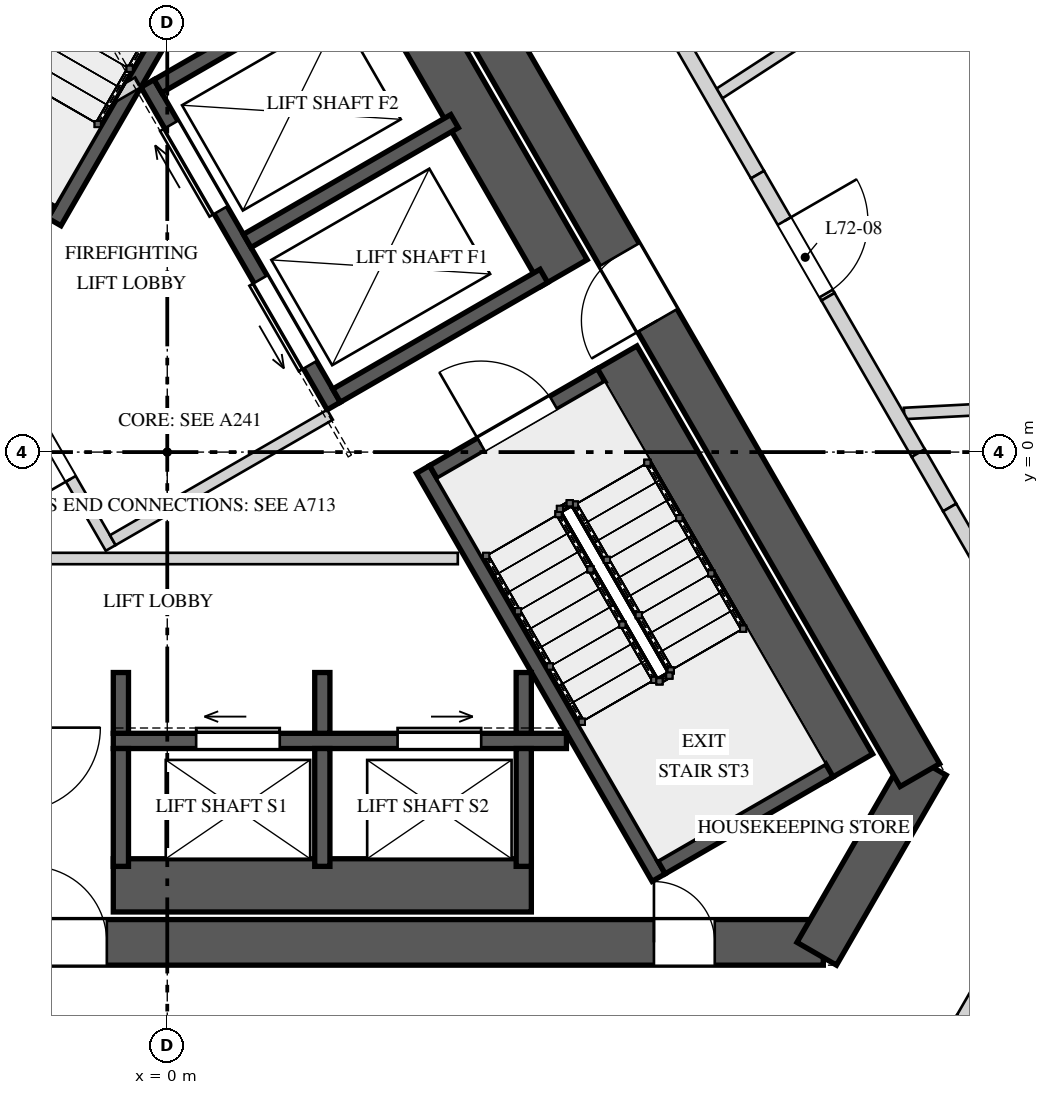
"""IFC4 building model, lengths in metres.
Left out: names, types, materials, properties, quantities, classifications, styles, units other than length and angle.
Written with IfcOpenShell. Run it as: python <this file> out.ifc"""

import sys

from ifc_helpers import new_model, si_unit, direction, frame, frame_2d, origin, place, context, subcontext, project, spatial, polyline, rectangle, outline, extrude, element, fill, save


model = new_model("IFC4")
c1 = context("Model", 3, precision=1e-05, world=origin(), true_north=direction((0.0, 1.0)))
c2 = subcontext(c1, "Body", "Model", "MODEL_VIEW")
j1 = project(units=[si_unit("LENGTHUNIT", "METRE"), si_unit("PLANEANGLEUNIT", "RADIAN")], contexts=[c1])
p1 = place(None, origin())
s1 = spatial("IfcSite", under=j1, at=p1, CompositionType="ELEMENT")
p2 = place(p1, origin())
s2 = spatial("IfcBuilding", under=s1, at=p2, CompositionType="ELEMENT")
p3 = place(p2, frame((0.0, 0.0, 306.4)))
s3 = spatial("IfcBuildingStorey", under=s2, at=p3, CompositionType="ELEMENT", Elevation=306.4)
p4 = place(p3, frame((-1.27, 10.7, 0.0), z_axis=(0.0, 0.0, 1.0), x_axis=(-0.499999536116, -0.866025671608, 0.0)))
e1 = element("IfcWall", 1, at=p4, inside=s3, PredefinedType="SHEAR", context=c2, shape_type="SweptSolid", body=[
    extrude(rectangle(XDim=17.263, YDim=0.6, at=frame_2d((8.631, 0.0))), origin(), (0.0, 0.0, 1.0), 14.0),
])
p5 = place(p4, frame((6.836, 0.0, 0.0)))
e2 = element("IfcOpeningElement", 2, at=p5, cuts=e1, PredefinedType="OPENING", context=c2, shape_type="SweptSolid", body=[
    extrude(rectangle(XDim=1.0, YDim=2.4, at=frame_2d((0.5, 1.2))), frame((0.0, 0.31, 0.0), z_axis=(0.0, -1.0, 0.0), x_axis=(1.0, 0.0, 0.0)), (0.0, 0.0, 1.0), 0.62),
])
p6 = place(p3, frame((-8.631, -6.45, 0.0), z_axis=(0.0, 0.0, 1.0), x_axis=(1.0, 0.0, 0.0)))
e3 = element("IfcWall", 3, at=p6, inside=s3, PredefinedType="SHEAR", context=c2, shape_type="SweptSolid", body=[
    extrude(rectangle(XDim=17.263, YDim=0.6, at=frame_2d((8.631, 0.0))), origin(), (0.0, 0.0, 1.0), 14.0),
])
p7 = place(p6, frame((6.836, 0.0, 0.0)))
e4 = element("IfcOpeningElement", 4, at=p7, cuts=e3, PredefinedType="OPENING", context=c2, shape_type="SweptSolid", body=[
    extrude(rectangle(XDim=1.0, YDim=2.4, at=frame_2d((0.5, 1.2))), frame((0.0, 0.31, 0.0), z_axis=(0.0, -1.0, 0.0), x_axis=(1.0, 0.0, 0.0)), (0.0, 0.0, 1.0), 0.62),
])
p8 = place(p6, frame((15.034, 0.0, 0.0)))
e5 = element("IfcOpeningElement", 5, at=p8, cuts=e3, PredefinedType="OPENING", context=c2, shape_type="SweptSolid", body=[
    extrude(rectangle(XDim=0.8, YDim=2.1, at=frame_2d((0.4, 1.05))), frame((0.0, 0.31, 0.0), z_axis=(0.0, -1.0, 0.0), x_axis=(1.0, 0.0, 0.0)), (0.0, 0.0, 1.0), 0.62),
])
p9 = place(p3, frame((8.545, -6.6, 0.0), z_axis=(0.0, 0.0, 1.0), x_axis=(0.499995765644, 0.866027848477, 0.0)))
e6 = element("IfcWall", 6, at=p9, inside=s3, PredefinedType="SHEAR", context=c2, shape_type="SweptSolid", body=[
    extrude(rectangle(XDim=2.887, YDim=0.6, at=frame_2d((1.443, 0.0))), origin(), (0.0, 0.0, 1.0), 14.0),
])
p10 = place(p3, frame((9.902, -4.25, 0.0), z_axis=(0.0, 0.0, 1.0), x_axis=(-0.499999536116, 0.866025671608, 0.0)))
e7 = element("IfcWall", 7, at=p10, inside=s3, PredefinedType="SHEAR", context=c2, shape_type="SweptSolid", body=[
    extrude(rectangle(XDim=17.263, YDim=0.6, at=frame_2d((8.631, 0.0))), origin(), (0.0, 0.0, 1.0), 14.0),
])
p11 = place(p10, frame((6.906, 0.0, 0.0)))
e8 = element("IfcOpeningElement", 8, at=p11, cuts=e7, PredefinedType="OPENING", context=c2, shape_type="SweptSolid", body=[
    extrude(rectangle(XDim=1.0, YDim=2.4, at=frame_2d((0.5, 1.2))), frame((0.0, 0.31, 0.0), z_axis=(0.0, -1.0, 0.0), x_axis=(1.0, 0.0, 0.0)), (0.0, 0.0, 1.0), 0.62),
])
p12 = place(p10, frame((14.567, 0.0, 0.0)))
e9 = element("IfcOpeningElement", 9, at=p12, cuts=e7, PredefinedType="OPENING", context=c2, shape_type="SweptSolid", body=[
    extrude(rectangle(XDim=0.8, YDim=2.1, at=frame_2d((0.4, 1.05))), frame((0.0, 0.31, 0.0), z_axis=(0.0, -1.0, 0.0), x_axis=(1.0, 0.0, 0.0)), (0.0, 0.0, 1.0), 0.62),
])
p13 = place(p3, frame((-0.896, 9.847, 0.0), z_axis=(0.0, 0.0, 1.0), x_axis=(-0.500009909098, -0.866019682689, 0.0)))
e10 = element("IfcWall", 10, at=p13, inside=s3, PredefinedType="SOLIDWALL", context=c2, shape_type="SweptSolid", body=[
    extrude(rectangle(XDim=6.2, YDim=0.7, at=frame_2d((3.1, 0.0))), origin(), (0.0, 0.0, 1.0), 13.65),
])
p14 = place(p3, frame((1.615, 8.397, 0.0), z_axis=(0.0, 0.0, 1.0), x_axis=(-0.500009909098, -0.866019682689, 0.0)))
e11 = element("IfcWall", 11, at=p14, inside=s3, PredefinedType="SOLIDWALL", context=c2, shape_type="SweptSolid", body=[
    extrude(rectangle(XDim=6.2, YDim=0.2, at=frame_2d((3.1, 0.0))), origin(), (0.0, 0.0, 1.0), 13.65),
])
p15 = place(p3, frame((-1.521, 3.165, 0.0), z_axis=(0.0, 0.0, 1.0), x_axis=(-0.866030925526, 0.499990435942, 0.0)))
e12 = element("IfcWall", 12, at=p15, inside=s3, PredefinedType="SOLIDWALL", context=c2, shape_type="SweptSolid", body=[
    extrude(rectangle(XDim=2.55, YDim=0.2, at=frame_2d((1.275, 0.0))), origin(), (0.0, 0.0, 1.0), 13.65),
])
p16 = place(p15, frame((0.725, 0.0, 0.0)))
e13 = element("IfcOpeningElement", 13, at=p16, cuts=e12, PredefinedType="OPENING", context=c2, shape_type="SweptSolid", body=[
    extrude(rectangle(XDim=1.1, YDim=2.4, at=frame_2d((0.55, 1.2))), frame((0.0, 0.11, 0.0), z_axis=(0.0, -1.0, 0.0), x_axis=(1.0, 0.0, 0.0)), (0.0, 0.0, 1.0), 0.22),
])
p17 = place(p3, frame((8.976, -4.147, 0.0), z_axis=(0.0, 0.0, 1.0), x_axis=(-0.49998037582, 0.866036733513, 0.0)))
e14 = element("IfcWall", 14, at=p17, inside=s3, PredefinedType="SOLIDWALL", context=c2, shape_type="SweptSolid", body=[
    extrude(rectangle(XDim=6.2, YDim=0.7, at=frame_2d((3.1, 0.0))), origin(), (0.0, 0.0, 1.0), 13.65),
])
p18 = place(p3, frame((6.465, -5.597, 0.0), z_axis=(0.0, 0.0, 1.0), x_axis=(-0.49998037582, 0.866036733513, 0.0)))
e15 = element("IfcWall", 15, at=p18, inside=s3, PredefinedType="SOLIDWALL", context=c2, shape_type="SweptSolid", body=[
    extrude(rectangle(XDim=6.2, YDim=0.2, at=frame_2d((3.1, 0.0))), origin(), (0.0, 0.0, 1.0), 13.65),
])
p19 = place(p3, frame((6.501, -5.461, 0.0), z_axis=(0.0, 0.0, 1.0), x_axis=(0.865989465428, 0.500062241894, 0.0)))
e16 = element("IfcWall", 16, at=p19, inside=s3, PredefinedType="SOLIDWALL", context=c2, shape_type="SweptSolid", body=[
    extrude(rectangle(XDim=2.55, YDim=0.2, at=frame_2d((1.275, 0.0))), origin(), (0.0, 0.0, 1.0), 13.65),
])
p20 = place(p3, frame((3.501, -0.265, 0.0), z_axis=(0.0, 0.0, 1.0), x_axis=(0.866030925526, 0.499990435942, 0.0)))
e17 = element("IfcWall", 17, at=p20, inside=s3, PredefinedType="SOLIDWALL", context=c2, shape_type="SweptSolid", body=[
    extrude(rectangle(XDim=2.55, YDim=0.2, at=frame_2d((1.275, 0.0))), origin(), (0.0, 0.0, 1.0), 13.65),
])
p21 = place(p20, frame((0.725, 0.0, 0.0)))
e18 = element("IfcOpeningElement", 18, at=p21, cuts=e17, PredefinedType="OPENING", context=c2, shape_type="SweptSolid", body=[
    extrude(rectangle(XDim=1.1, YDim=2.4, at=frame_2d((0.55, 1.2))), frame((0.0, 0.11, 0.0), z_axis=(0.0, -1.0, 0.0), x_axis=(1.0, 0.0, 0.0)), (0.0, 0.0, 1.0), 0.22),
])
p22 = place(p3, frame((-0.71, -3.8, 0.0), z_axis=(0.0, 0.0, 1.0), x_axis=(1.0, 0.0, 0.0)))
e19 = element("IfcWall", 19, at=p22, inside=s3, PredefinedType="SOLIDWALL", context=c2, shape_type="SweptSolid", body=[
    extrude(rectangle(XDim=5.961, YDim=0.2, at=frame_2d((2.981, 0.0))), origin(), (0.0, 0.0, 1.0), 13.65),
])
p23 = place(p22, frame((1.09, 0.0, 0.0)))
e20 = element("IfcOpeningElement", 20, at=p23, cuts=e19, PredefinedType="OPENING", context=c2, shape_type="SweptSolid", body=[
    extrude(rectangle(XDim=1.1, YDim=2.1, at=frame_2d((0.55, 1.05))), frame((0.0, 0.11, 0.0), z_axis=(0.0, -1.0, 0.0), x_axis=(1.0, 0.0, 0.0)), (0.0, 0.0, 1.0), 0.22),
])
p24 = place(p22, frame((3.74, 0.0, 0.0)))
e21 = element("IfcOpeningElement", 21, at=p24, cuts=e19, PredefinedType="OPENING", context=c2, shape_type="SweptSolid", body=[
    extrude(rectangle(XDim=1.1, YDim=2.1, at=frame_2d((0.55, 1.05))), frame((0.0, 0.11, 0.0), z_axis=(0.0, -1.0, 0.0), x_axis=(1.0, 0.0, 0.0)), (0.0, 0.0, 1.0), 0.22),
])
p25 = place(p3, frame((-0.71, -5.7, 0.0), z_axis=(0.0, 0.0, 1.0), x_axis=(1.0, 0.0, 0.0)))
e22 = element("IfcWall", 22, at=p25, inside=s3, PredefinedType="SOLIDWALL", context=c2, shape_type="SweptSolid", body=[
    extrude(rectangle(XDim=5.5, YDim=0.7, at=frame_2d((2.75, 0.0))), origin(), (0.0, 0.0, 1.0), 13.65),
])
p26 = place(p3, frame((-0.61, -3.9, 0.0), z_axis=(0.0, 0.0, 1.0), x_axis=(0.0, -1.0, 0.0)))
e23 = element("IfcWall", 23, at=p26, inside=s3, PredefinedType="SOLIDWALL", context=c2, shape_type="SweptSolid", body=[
    extrude(rectangle(XDim=1.55, YDim=0.2, at=frame_2d((0.775, 0.0))), origin(), (0.0, 0.0, 1.0), 13.65),
])
p27 = place(p3, frame((-0.61, -2.9, 0.0), z_axis=(0.0, 0.0, 1.0), x_axis=(0.0, -1.0, 0.0)))
e24 = element("IfcWall", 24, at=p27, inside=s3, PredefinedType="SOLIDWALL", context=c2, shape_type="SweptSolid", body=[
    extrude(rectangle(XDim=0.8, YDim=0.2, at=frame_2d((0.4, 0.0))), origin(), (0.0, 0.0, 1.0), 13.65),
])
p28 = place(p3, frame((2.04, -3.9, 0.0), z_axis=(0.0, 0.0, 1.0), x_axis=(0.0, -1.0, 0.0)))
e25 = element("IfcWall", 25, at=p28, inside=s3, PredefinedType="SOLIDWALL", context=c2, shape_type="SweptSolid", body=[
    extrude(rectangle(XDim=1.55, YDim=0.2, at=frame_2d((0.775, 0.0))), origin(), (0.0, 0.0, 1.0), 13.65),
])
p29 = place(p3, frame((2.04, -2.9, 0.0), z_axis=(0.0, 0.0, 1.0), x_axis=(0.0, -1.0, 0.0)))
e26 = element("IfcWall", 26, at=p29, inside=s3, PredefinedType="SOLIDWALL", context=c2, shape_type="SweptSolid", body=[
    extrude(rectangle(XDim=0.8, YDim=0.2, at=frame_2d((0.4, 0.0))), origin(), (0.0, 0.0, 1.0), 13.65),
])
p30 = place(p3, frame((4.69, -3.9, 0.0), z_axis=(0.0, 0.0, 1.0), x_axis=(0.0, -1.0, 0.0)))
e27 = element("IfcWall", 27, at=p30, inside=s3, PredefinedType="SOLIDWALL", context=c2, shape_type="SweptSolid", body=[
    extrude(rectangle(XDim=1.55, YDim=0.2, at=frame_2d((0.775, 0.0))), origin(), (0.0, 0.0, 1.0), 13.65),
])
p31 = place(p3, frame((4.69, -2.9, 0.0), z_axis=(0.0, 0.0, 1.0), x_axis=(0.0, -1.0, 0.0)))
e28 = element("IfcWall", 28, at=p31, inside=s3, PredefinedType="SOLIDWALL", context=c2, shape_type="SweptSolid", body=[
    extrude(rectangle(XDim=0.8, YDim=0.2, at=frame_2d((0.4, 0.0))), origin(), (0.0, 0.0, 1.0), 13.65),
])
p32 = place(p3, frame((2.19, 0.606, 0.0), z_axis=(0.0, 0.0, 1.0), x_axis=(-0.500002801628, 0.866023786258, 0.0)))
e29 = element("IfcWall", 29, at=p32, inside=s3, PredefinedType="SOLIDWALL", context=c2, shape_type="SweptSolid", body=[
    extrude(rectangle(XDim=4.9, YDim=0.2, at=frame_2d((2.45, 0.0))), origin(), (0.0, 0.0, 1.0), 13.65),
])
p33 = place(p32, frame((0.625, 0.0, 0.0)))
e30 = element("IfcOpeningElement", 30, at=p33, cuts=e29, PredefinedType="OPENING", context=c2, shape_type="SweptSolid", body=[
    extrude(rectangle(XDim=1.3, YDim=2.1, at=frame_2d((0.65, 1.05))), frame((0.0, 0.11, 0.0), z_axis=(0.0, -1.0, 0.0), x_axis=(1.0, 0.0, 0.0)), (0.0, 0.0, 1.0), 0.22),
])
p34 = place(p32, frame((2.975, 0.0, 0.0)))
e31 = element("IfcOpeningElement", 31, at=p34, cuts=e29, PredefinedType="OPENING", context=c2, shape_type="SweptSolid", body=[
    extrude(rectangle(XDim=1.3, YDim=2.1, at=frame_2d((0.65, 1.05))), frame((0.0, 0.11, 0.0), z_axis=(0.0, -1.0, 0.0), x_axis=(1.0, 0.0, 0.0)), (0.0, 0.0, 1.0), 0.22),
])
p35 = place(p3, frame((5.221, 2.356, 0.0), z_axis=(0.0, 0.0, 1.0), x_axis=(-0.500040169509, 0.866002210665, 0.0)))
e32 = element("IfcWall", 32, at=p35, inside=s3, PredefinedType="SOLIDWALL", context=c2, shape_type="SweptSolid", body=[
    extrude(rectangle(XDim=4.9, YDim=0.7, at=frame_2d((2.45, 0.0))), origin(), (0.0, 0.0, 1.0), 13.65),
])
for number, where, z_axis, x_axis in (
    (33, (2.227, 0.743, 0.0), (0.0, 0.0, 1.0), (0.866, 0.5, 0.0)),
    (34, (1.052, 2.778, 0.0), (0.0, 0.0, 1.0), (0.866, 0.5, 0.0)),
    (35, (-0.123, 4.813, 0.0), (0.0, 0.0, 1.0), (0.866, 0.5, 0.0)),
):
    element("IfcWall", number, at=place(p3, frame(where, z_axis=z_axis, x_axis=x_axis)), inside=s3, PredefinedType="SOLIDWALL", context=c2, shape_type="SweptSolid", body=[
        extrude(rectangle(XDim=3.15, YDim=0.2, at=frame_2d((1.575, 0.0))), origin(), (0.0, 0.0, 1.0), 13.65),
    ])
p36 = place(p3, frame((-0.744, -1.261, 0.0), z_axis=(0.0, 0.0, 1.0), x_axis=(-0.500004234368, 0.866022959057, 0.0)))
e36 = element("IfcWall", 36, at=p36, inside=s3, PredefinedType="PARTITIONING", context=c2, shape_type="SweptSolid", body=[
    extrude(rectangle(XDim=3.125, YDim=0.15, at=frame_2d((1.562, 0.0))), origin(), (0.0, 0.0, 1.0), 13.65),
])
p37 = place(p36, frame((1.05, 0.0, 0.0)))
e37 = element("IfcOpeningElement", 37, at=p37, cuts=e36, PredefinedType="OPENING", context=c2, shape_type="SweptSolid", body=[
    extrude(rectangle(XDim=1.1, YDim=2.4, at=frame_2d((0.55, 1.2))), frame((0.0, 0.085, 0.0), z_axis=(0.0, -1.0, 0.0), x_axis=(1.0, 0.0, 0.0)), (0.0, 0.0, 1.0), 0.17),
])
p38 = place(p3, frame((-0.717, -1.159, 0.0), z_axis=(0.0, 0.0, 1.0), x_axis=(0.866008176907, 0.50002983664, 0.0)))
e38 = element("IfcWall", 38, at=p38, inside=s3, PredefinedType="PARTITIONING", context=c2, shape_type="SweptSolid", body=[
    extrude(rectangle(XDim=3.3, YDim=0.15, at=frame_2d((1.65, 0.0))), origin(), (0.0, 0.0, 1.0), 13.65),
])
p39 = place(p3, frame((-2.178, 1.372, 0.0), z_axis=(0.0, 0.0, 1.0), x_axis=(0.258808958833, 0.96592852884, 0.0)))
e39 = element("IfcWall", 39, at=p39, inside=s3, PredefinedType="PARTITIONING", context=c2, shape_type="SweptSolid", body=[
    extrude(rectangle(XDim=2.903, YDim=0.15, at=frame_2d((1.451, 0.0))), origin(), (0.0, 0.0, 1.0), 13.65),
])
p40 = place(p3, frame((-1.51, 4.215, 0.0), z_axis=(0.0, 0.0, 1.0), x_axis=(0.866085525409, 0.49989585183, 0.0)))
e40 = element("IfcWall", 40, at=p40, inside=s3, PredefinedType="PARTITIONING", context=c2, shape_type="SweptSolid", body=[
    extrude(rectangle(XDim=1.3, YDim=0.15, at=frame_2d((0.65, 0.0))), origin(), (0.0, 0.0, 1.0), 13.65),
])
p41 = place(p3, frame((-4.053, -1.4, 0.0), z_axis=(0.0, 0.0, 1.0), x_axis=(1.0, 0.0, 0.0)))
e41 = element("IfcWall", 41, at=p41, inside=s3, PredefinedType="PARTITIONING", context=c2, shape_type="SweptSolid", body=[
    extrude(rectangle(XDim=7.876, YDim=0.15, at=frame_2d((3.938, 0.0))), origin(), (0.0, 0.0, 1.0), 13.65),
])
p42 = place(p3, frame((7.264, 4.718, 0.0), z_axis=(0.0, 0.0, 1.0), x_axis=(0.838671229972, 0.544638015583, 0.0)))
e42 = element("IfcWall", 42, at=p42, inside=s3, PredefinedType="PARTITIONING", context=c2, shape_type="SweptSolid", body=[
    extrude(rectangle(XDim=8.011, YDim=0.15, at=frame_2d((4.005, 0.0))), origin(), (0.0, 0.0, 1.0), 13.65),
])
p43 = place(p3, frame((9.695, 0.508, 0.0), z_axis=(0.0, 0.0, 1.0), x_axis=(0.998629649164, 0.05233377313, 0.0)))
e43 = element("IfcWall", 43, at=p43, inside=s3, PredefinedType="PARTITIONING", context=c2, shape_type="SweptSolid", body=[
    extrude(rectangle(XDim=4.726, YDim=0.15, at=frame_2d((2.363, 0.0))), origin(), (0.0, 0.0, 1.0), 13.65),
])
p44 = place(p3, frame((10.825, -6.851, 0.0), z_axis=(0.0, 0.0, 1.0), x_axis=(-0.500144223137, -0.865942120504, 0.0)))
e44 = element("IfcWall", 44, at=p44, inside=s3, PredefinedType="SOLIDWALL", context=c2, shape_type="SweptSolid", body=[
    extrude(rectangle(XDim=0.701, YDim=0.2, at=frame_2d((0.351, 0.0))), origin(), (0.0, 0.0, 1.0), 12.95),
])
p45 = place(p3, frame((4.99, 8.457, 0.0), z_axis=(0.0, 0.0, 1.0), x_axis=(0.500004219487, -0.866022967649, 0.0)))
e45 = element("IfcWall", 45, at=p45, inside=s3, PredefinedType="SOLIDWALL", context=c2, shape_type="SweptSolid", body=[
    extrude(rectangle(XDim=5.55, YDim=0.2, at=frame_2d((2.775, 0.0))), origin(), (0.0, 0.0, 1.0), 13.65),
])
p46 = place(p45, frame((1.243, 0.0, 0.0)))
e46 = element("IfcOpeningElement", 46, at=p46, cuts=e45, PredefinedType="OPENING", context=c2, shape_type="SweptSolid", body=[
    extrude(rectangle(XDim=1.1, YDim=2.2, at=frame_2d((0.55, 1.1))), frame((0.0, 0.11, 0.0), z_axis=(0.0, -1.0, 0.0), x_axis=(1.0, 0.0, 0.0)), (0.0, 0.0, 1.0), 0.22),
])
p47 = place(p3, frame((7.765, 3.65, 0.0), z_axis=(0.0, 0.0, 1.0), x_axis=(0.500045188778, -0.865999312459, 0.0)))
e47 = element("IfcWall", 47, at=p47, inside=s3, PredefinedType="SOLIDWALL", context=c2, shape_type="SweptSolid", body=[
    extrude(outline(polyline([(0.0, 0.0), (1.855, 0.0), (1.855, 13.65), (0.807, 13.65), (0.807, 12.75), (0.0, 12.75), (0.0, 0.0)])), frame((0.0, 0.1, 0.0), z_axis=(0.0, -1.0, 0.0), x_axis=(1.0, 0.0, 0.0)), (0.0, 0.0, 1.0), 0.2),
])
p48 = place(p47, frame((0.705, 0.0, 0.0)))
e48 = element("IfcOpeningElement", 48, at=p48, cuts=e47, PredefinedType="OPENING", context=c2, shape_type="SweptSolid", body=[
    extrude(rectangle(XDim=1.1, YDim=2.2, at=frame_2d((0.55, 1.1))), frame((0.0, 0.11, 0.0), z_axis=(0.0, -1.0, 0.0), x_axis=(1.0, 0.0, 0.0)), (0.0, 0.0, 1.0), 0.22),
])
p49 = place(p3, frame((8.693, 2.043, 0.0), z_axis=(0.0, 0.0, 1.0), x_axis=(0.499953838557, -0.866052053466, 0.0)))
e49 = element("IfcWall", 49, at=p49, inside=s3, PredefinedType="SOLIDWALL", context=c2, shape_type="SweptSolid", body=[
    extrude(rectangle(XDim=2.375, YDim=0.2, at=frame_2d((1.188, 0.0))), origin(), (0.0, 0.0, 1.0), 13.65),
])
p50 = place(p3, frame((9.88, -0.013, 0.0), z_axis=(0.0, 0.0, 1.0), x_axis=(0.499952654668, -0.866052736899, 0.0)))
e50 = element("IfcWall", 50, at=p50, inside=s3, PredefinedType="SOLIDWALL", context=c2, shape_type="SweptSolid", body=[
    extrude(rectangle(XDim=0.826, YDim=0.2, at=frame_2d((0.413, 0.0))), origin(), (0.0, 0.0, 1.0), 12.95),
])
p51 = place(p3, frame((10.293, -0.729, 0.0), z_axis=(0.0, 0.0, 1.0), x_axis=(0.50002046505, -0.86601358796, 0.0)))
e51 = element("IfcWall", 51, at=p51, inside=s3, PredefinedType="SOLIDWALL", context=c2, shape_type="SweptSolid", body=[
    extrude(rectangle(XDim=4.066, YDim=0.2, at=frame_2d((2.033, 0.0))), origin(), (0.0, 0.0, 1.0), 13.65),
])
p52 = place(p51, frame((0.717, 0.0, 0.0)))
e52 = element("IfcOpeningElement", 52, at=p52, cuts=e51, PredefinedType="OPENING", context=c2, shape_type="SweptSolid", body=[
    extrude(rectangle(XDim=1.1, YDim=2.2, at=frame_2d((0.55, 1.1))), frame((0.0, 0.11, 0.0), z_axis=(0.0, -1.0, 0.0), x_axis=(1.0, 0.0, 0.0)), (0.0, 0.0, 1.0), 0.22),
])
p53 = place(p21, origin())
e53 = element("IfcDoor", 53, at=p53, inside=s3, OperationType="SINGLE_SWING_RIGHT", PredefinedType="DOOR", context=c2, shape_type="SweptSolid", body=[
    extrude(rectangle(XDim=1.1, YDim=2.4, at=frame_2d((0.55, 1.2))), frame((0.0, 0.025, 0.0), z_axis=(0.0, -1.0, 0.0), x_axis=(1.0, 0.0, 0.0)), (0.0, 0.0, 1.0), 0.05),
])
fill(e18, e53)
p54 = place(p23, origin())
e54 = element("IfcDoor", 54, at=p54, inside=s3, OperationType="SLIDING_TO_LEFT", PredefinedType="DOOR", context=c2, shape_type="SweptSolid", body=[
    extrude(rectangle(XDim=1.1, YDim=2.1, at=frame_2d((0.55, 1.05))), frame((0.0, 0.025, 0.0), z_axis=(0.0, -1.0, 0.0), x_axis=(1.0, 0.0, 0.0)), (0.0, 0.0, 1.0), 0.05),
])
fill(e20, e54)
p55 = place(p24, origin())
e55 = element("IfcDoor", 55, at=p55, inside=s3, OperationType="SLIDING_TO_RIGHT", PredefinedType="DOOR", context=c2, shape_type="SweptSolid", body=[
    extrude(rectangle(XDim=1.1, YDim=2.1, at=frame_2d((0.55, 1.05))), frame((0.0, 0.025, 0.0), z_axis=(0.0, -1.0, 0.0), x_axis=(1.0, 0.0, 0.0)), (0.0, 0.0, 1.0), 0.05),
])
fill(e21, e55)
p56 = place(p33, origin())
e56 = element("IfcDoor", 56, at=p56, inside=s3, OperationType="SLIDING_TO_LEFT", PredefinedType="DOOR", context=c2, shape_type="SweptSolid", body=[
    extrude(rectangle(XDim=1.3, YDim=2.1, at=frame_2d((0.65, 1.05))), frame((0.0, 0.025, 0.0), z_axis=(0.0, -1.0, 0.0), x_axis=(1.0, 0.0, 0.0)), (0.0, 0.0, 1.0), 0.05),
])
fill(e30, e56)
p57 = place(p34, origin())
e57 = element("IfcDoor", 57, at=p57, inside=s3, OperationType="SLIDING_TO_RIGHT", PredefinedType="DOOR", context=c2, shape_type="SweptSolid", body=[
    extrude(rectangle(XDim=1.3, YDim=2.1, at=frame_2d((0.65, 1.05))), frame((0.0, 0.025, 0.0), z_axis=(0.0, -1.0, 0.0), x_axis=(1.0, 0.0, 0.0)), (0.0, 0.0, 1.0), 0.05),
])
fill(e31, e57)
p58 = place(p37, origin())
e58 = element("IfcDoor", 58, at=p58, inside=s3, OperationType="SINGLE_SWING_LEFT", PredefinedType="DOOR", context=c2, shape_type="SweptSolid", body=[
    extrude(rectangle(XDim=1.1, YDim=2.4, at=frame_2d((0.55, 1.2))), frame((0.0, 0.025, 0.0), z_axis=(0.0, -1.0, 0.0), x_axis=(1.0, 0.0, 0.0)), (0.0, 0.0, 1.0), 0.05),
])
fill(e37, e58)
p59 = place(p7, origin())
e59 = element("IfcDoor", 59, at=p59, inside=s3, OperationType="SINGLE_SWING_LEFT", PredefinedType="DOOR", context=c2, shape_type="SweptSolid", body=[
    extrude(rectangle(XDim=1.0, YDim=2.4, at=frame_2d((0.5, 1.2))), frame((0.0, 0.025, 0.0), z_axis=(0.0, -1.0, 0.0), x_axis=(1.0, 0.0, 0.0)), (0.0, 0.0, 1.0), 0.05),
])
fill(e4, e59)
p60 = place(p11, origin())
e60 = element("IfcDoor", 60, at=p60, inside=s3, OperationType="SINGLE_SWING_RIGHT", PredefinedType="DOOR", context=c2, shape_type="SweptSolid", body=[
    extrude(rectangle(XDim=1.0, YDim=2.4, at=frame_2d((0.5, 1.2))), frame((0.0, 0.025, 0.0), z_axis=(0.0, -1.0, 0.0), x_axis=(1.0, 0.0, 0.0)), (0.0, 0.0, 1.0), 0.05),
])
fill(e8, e60)
p61 = place(p8, origin())
e61 = element("IfcDoor", 61, at=p61, inside=s3, OperationType="SINGLE_SWING_LEFT", PredefinedType="DOOR", context=c2, shape_type="SweptSolid", body=[
    extrude(rectangle(XDim=0.8, YDim=2.1, at=frame_2d((0.4, 1.05))), frame((0.0, 0.025, 0.0), z_axis=(0.0, -1.0, 0.0), x_axis=(1.0, 0.0, 0.0)), (0.0, 0.0, 1.0), 0.05),
])
fill(e5, e61)
p62 = place(p48, origin())
e62 = element("IfcDoor", 62, at=p62, inside=s3, OperationType="SINGLE_SWING_RIGHT", PredefinedType="DOOR", context=c2, shape_type="SweptSolid", body=[
    extrude(rectangle(XDim=1.1, YDim=2.2, at=frame_2d((0.55, 1.1))), frame((0.0, 0.025, 0.0), z_axis=(0.0, -1.0, 0.0), x_axis=(1.0, 0.0, 0.0)), (0.0, 0.0, 1.0), 0.05),
])
fill(e48, e62)
save(model, sys.argv[1])
